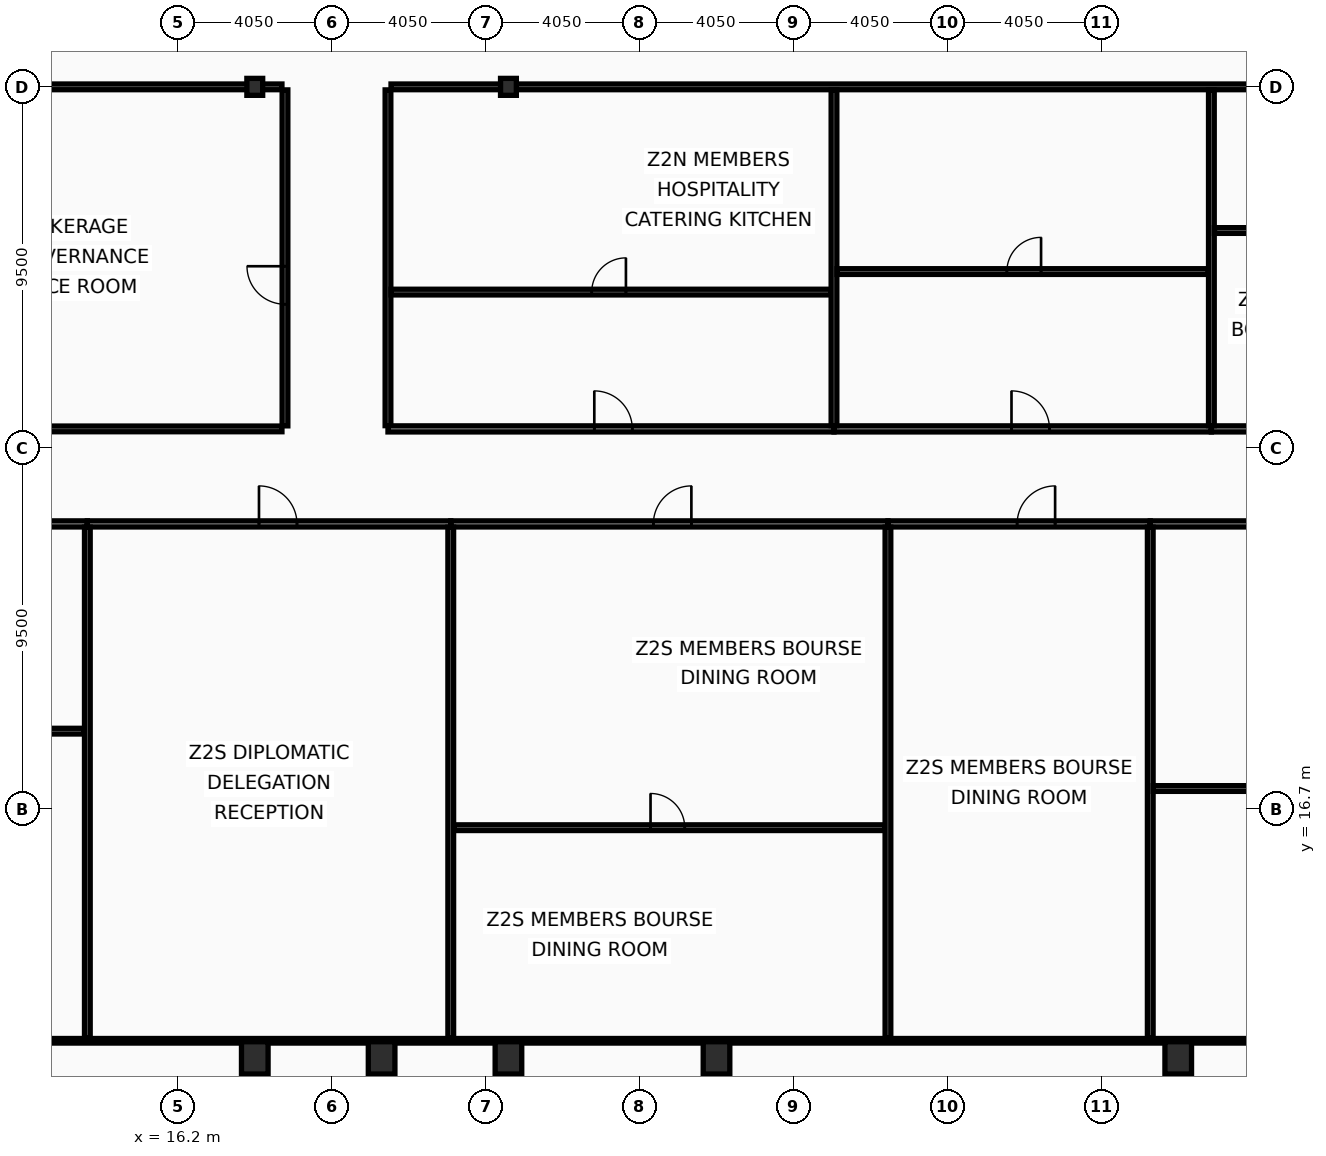
"""IFC4 building model, lengths in metres.
Left out: names, types, materials, properties, quantities, classifications, styles, units other than length and angle.
Written with IfcOpenShell. Run it as: python <this file> out.ifc"""

import sys

from ifc_helpers import new_model, si_unit, direction, frame, frame_2d, origin, origin_2d, place, context, subcontext, project, spatial, rectangle, hollow_rectangle, i_section, extrude, element, fill, save


model = new_model("IFC4")
c1 = context("Model", 3, precision=1e-05, world=origin(), true_north=direction((0.0, 1.0)))
c2 = subcontext(c1, "Body", "Model", "MODEL_VIEW")
j1 = project(units=[si_unit("LENGTHUNIT", "METRE"), si_unit("PLANEANGLEUNIT", "RADIAN")], contexts=[c1])
p1 = place(None, origin())
s1 = spatial("IfcSite", under=j1, at=p1, CompositionType="ELEMENT")
p2 = place(p1, origin())
s2 = spatial("IfcBuilding", under=s1, at=p2, CompositionType="ELEMENT")
p3 = place(p2, frame((0.0, 0.0, 139.8)))
s3 = spatial("IfcBuildingStorey", under=s2, at=p3, CompositionType="ELEMENT", Elevation=139.8)
for number, where, z_axis, x_axis in (
    (1, (18.225, 10.15, 0.0), (0.0, 0.0, 1.0), (1.0, 0.0, 0.0)),
    (2, (21.562, 10.15, 0.0), (0.0, 0.0, 1.0), (1.0, 0.0, 0.0)),
    (3, (24.9, 10.15, 0.0), (0.0, 0.0, 1.0), (1.0, 0.0, 0.0)),
    (4, (30.375, 10.15, 0.0), (0.0, 0.0, 1.0), (1.0, 0.0, 0.0)),
    (5, (42.525, 10.15, 0.0), (0.0, 0.0, 1.0), (1.0, 0.0, 0.0)),
):
    element("IfcColumn", number, at=place(p3, frame(where, z_axis=z_axis, x_axis=x_axis)), inside=s3, PredefinedType="COLUMN", context=c2, shape_type="SweptSolid", body=[
        extrude(hollow_rectangle(XDim=0.7, YDim=0.85, WallThickness=0.05, at=origin_2d()), origin(), (0.0, 0.0, 1.0), 3.6),
    ])
for number, where, z_axis, x_axis in (
    (6, (18.225, 35.7, 0.0), (0.0, 0.0, 1.0), (1.0, 0.0, 0.0)),
    (7, (24.9, 35.7, 0.0), (0.0, 0.0, 1.0), (1.0, 0.0, 0.0)),
):
    element("IfcColumn", number, at=place(p3, frame(where, z_axis=z_axis, x_axis=x_axis)), inside=s3, PredefinedType="COLUMN", context=c2, shape_type="SweptSolid", body=[
        extrude(i_section(OverallWidth=0.416, OverallDepth=0.446, WebThickness=0.039, FlangeThickness=0.063, at=origin_2d()), origin(), (0.0, 0.0, 1.0), 3.6),
    ])
p4 = place(p3, frame((6.03, 24.2, 0.0), z_axis=(0.0, 0.0, 1.0), x_axis=(1.0, 0.0, 0.0)))
e8 = element("IfcWall", 8, at=p4, inside=s3, PredefinedType="PARTITIONING", context=c2, shape_type="SweptSolid", body=[
    extrude(rectangle(XDim=7.789, YDim=0.16, at=frame_2d((3.895, 0.0))), origin(), (0.0, 0.0, 1.0), 3.44),
])
p5 = place(p4, frame((3.771, 0.0, 0.0)))
e9 = element("IfcOpeningElement", 9, at=p5, cuts=e8, PredefinedType="OPENING", context=c2, shape_type="SweptSolid", body=[
    extrude(rectangle(XDim=1.0, YDim=2.05, at=frame_2d((0.5, 1.025))), frame((0.0, 0.09, 0.0), z_axis=(0.0, -1.0, 0.0), x_axis=(1.0, 0.0, 0.0)), (0.0, 0.0, 1.0), 0.18),
])
p6 = place(p3, frame((6.095, 18.747, 0.0), z_axis=(0.0, 0.0, 1.0), x_axis=(1.0, 0.0, 0.0)))
e10 = element("IfcWall", 10, at=p6, inside=s3, PredefinedType="PARTITIONING", context=c2, shape_type="SweptSolid", body=[
    extrude(rectangle(XDim=7.644, YDim=0.15, at=frame_2d((3.822, 0.0))), origin(), (0.0, 0.0, 1.0), 2.73),
])
p7 = place(p6, frame((3.505, 0.0, 0.0)))
e11 = element("IfcOpeningElement", 11, at=p7, cuts=e10, PredefinedType="OPENING", context=c2, shape_type="SweptSolid", body=[
    extrude(rectangle(XDim=0.9, YDim=2.05, at=frame_2d((0.45, 1.025))), frame((0.0, 0.085, 0.0), z_axis=(0.0, -1.0, 0.0), x_axis=(1.0, 0.0, 0.0)), (0.0, 0.0, 1.0), 0.17),
])
p8 = place(p3, frame((13.819, 24.2, 0.0), z_axis=(0.0, 0.0, 1.0), x_axis=(1.0, 0.0, 0.0)))
e12 = element("IfcWall", 12, at=p8, inside=s3, PredefinedType="PARTITIONING", context=c2, shape_type="SweptSolid", body=[
    extrude(rectangle(XDim=9.563, YDim=0.16, at=frame_2d((4.781, 0.0))), origin(), (0.0, 0.0, 1.0), 2.73),
])
p9 = place(p8, frame((4.516, 0.0, 0.0)))
e13 = element("IfcOpeningElement", 13, at=p9, cuts=e12, PredefinedType="OPENING", context=c2, shape_type="SweptSolid", body=[
    extrude(rectangle(XDim=1.0, YDim=2.05, at=frame_2d((0.5, 1.025))), frame((0.0, 0.09, 0.0), z_axis=(0.0, -1.0, 0.0), x_axis=(1.0, 0.0, 0.0)), (0.0, 0.0, 1.0), 0.18),
])
p10 = place(p3, frame((13.819, 10.665, 0.0), z_axis=(0.0, 0.0, 1.0), x_axis=(0.0, 1.0, 0.0)))
e14 = element("IfcWall", 14, at=p10, inside=s3, PredefinedType="PARTITIONING", context=c2, shape_type="SweptSolid", body=[
    extrude(rectangle(XDim=13.45, YDim=0.15, at=frame_2d((6.725, 0.0))), origin(), (0.0, 0.0, 1.0), 2.73),
])
p11 = place(p3, frame((23.382, 24.2, 0.0), z_axis=(0.0, 0.0, 1.0), x_axis=(1.0, 0.0, 0.0)))
e15 = element("IfcWall", 15, at=p11, inside=s3, PredefinedType="PARTITIONING", context=c2, shape_type="SweptSolid", body=[
    extrude(rectangle(XDim=11.504, YDim=0.16, at=frame_2d((5.752, 0.0))), origin(), (0.0, 0.0, 1.0), 2.73),
])
p12 = place(p11, frame((5.332, 0.0, 0.0)))
e16 = element("IfcOpeningElement", 16, at=p12, cuts=e15, PredefinedType="OPENING", context=c2, shape_type="SweptSolid", body=[
    extrude(rectangle(XDim=1.0, YDim=2.05, at=frame_2d((0.5, 1.025))), frame((0.0, 0.09, 0.0), z_axis=(0.0, -1.0, 0.0), x_axis=(1.0, 0.0, 0.0)), (0.0, 0.0, 1.0), 0.18),
])
p13 = place(p3, frame((23.382, 10.665, 0.0), z_axis=(0.0, 0.0, 1.0), x_axis=(0.0, 1.0, 0.0)))
e17 = element("IfcWall", 17, at=p13, inside=s3, PredefinedType="PARTITIONING", context=c2, shape_type="SweptSolid", body=[
    extrude(rectangle(XDim=13.45, YDim=0.15, at=frame_2d((6.725, 0.0))), origin(), (0.0, 0.0, 1.0), 2.93),
])
p14 = place(p3, frame((23.462, 16.207, 0.0), z_axis=(0.0, 0.0, 1.0), x_axis=(1.0, 0.0, 0.0)))
e18 = element("IfcWall", 18, at=p14, inside=s3, PredefinedType="PARTITIONING", context=c2, shape_type="SweptSolid", body=[
    extrude(rectangle(XDim=11.344, YDim=0.15, at=frame_2d((5.672, 0.0))), origin(), (0.0, 0.0, 1.0), 2.73),
])
p15 = place(p14, frame((5.177, 0.0, 0.0)))
e19 = element("IfcOpeningElement", 19, at=p15, cuts=e18, PredefinedType="OPENING", context=c2, shape_type="SweptSolid", body=[
    extrude(rectangle(XDim=0.9, YDim=2.05, at=frame_2d((0.45, 1.025))), frame((0.0, 0.085, 0.0), z_axis=(0.0, -1.0, 0.0), x_axis=(1.0, 0.0, 0.0)), (0.0, 0.0, 1.0), 0.17),
])
p16 = place(p3, frame((34.886, 24.2, 0.0), z_axis=(0.0, 0.0, 1.0), x_axis=(1.0, 0.0, 0.0)))
e20 = element("IfcWall", 20, at=p16, inside=s3, PredefinedType="PARTITIONING", context=c2, shape_type="SweptSolid", body=[
    extrude(rectangle(XDim=6.902, YDim=0.16, at=frame_2d((3.451, 0.0))), origin(), (0.0, 0.0, 1.0), 3.44),
])
p17 = place(p16, frame((3.399, 0.0, 0.0)))
e21 = element("IfcOpeningElement", 21, at=p17, cuts=e20, PredefinedType="OPENING", context=c2, shape_type="SweptSolid", body=[
    extrude(rectangle(XDim=1.0, YDim=2.05, at=frame_2d((0.5, 1.025))), frame((0.0, 0.09, 0.0), z_axis=(0.0, -1.0, 0.0), x_axis=(1.0, 0.0, 0.0)), (0.0, 0.0, 1.0), 0.18),
])
p18 = place(p3, frame((34.886, 10.665, 0.0), z_axis=(0.0, 0.0, 1.0), x_axis=(0.0, 1.0, 0.0)))
e22 = element("IfcWall", 22, at=p18, inside=s3, PredefinedType="PARTITIONING", context=c2, shape_type="SweptSolid", body=[
    extrude(rectangle(XDim=13.45, YDim=0.15, at=frame_2d((6.725, 0.0))), origin(), (0.0, 0.0, 1.0), 2.93),
])
p19 = place(p3, frame((41.789, 24.2, 0.0), z_axis=(0.0, 0.0, 1.0), x_axis=(1.0, 0.0, 0.0)))
e23 = element("IfcWall", 23, at=p19, inside=s3, PredefinedType="PARTITIONING", context=c2, shape_type="SweptSolid", body=[
    extrude(rectangle(XDim=7.214, YDim=0.16, at=frame_2d((3.607, 0.0))), origin(), (0.0, 0.0, 1.0), 2.73),
])
p20 = place(p19, frame((3.53, 0.0, 0.0)))
e24 = element("IfcOpeningElement", 24, at=p20, cuts=e23, PredefinedType="OPENING", context=c2, shape_type="SweptSolid", body=[
    extrude(rectangle(XDim=1.0, YDim=2.05, at=frame_2d((0.5, 1.025))), frame((0.0, 0.09, 0.0), z_axis=(0.0, -1.0, 0.0), x_axis=(1.0, 0.0, 0.0)), (0.0, 0.0, 1.0), 0.18),
])
p21 = place(p3, frame((41.789, 10.665, 0.0), z_axis=(0.0, 0.0, 1.0), x_axis=(0.0, 1.0, 0.0)))
e25 = element("IfcWall", 25, at=p21, inside=s3, PredefinedType="PARTITIONING", context=c2, shape_type="SweptSolid", body=[
    extrude(rectangle(XDim=13.45, YDim=0.15, at=frame_2d((6.725, 0.0))), origin(), (0.0, 0.0, 1.0), 2.93),
])
p22 = place(p3, frame((41.869, 17.238, 0.0), z_axis=(0.0, 0.0, 1.0), x_axis=(1.0, 0.0, 0.0)))
e26 = element("IfcWall", 26, at=p22, inside=s3, PredefinedType="PARTITIONING", context=c2, shape_type="SweptSolid", body=[
    extrude(rectangle(XDim=7.054, YDim=0.15, at=frame_2d((3.527, 0.0))), origin(), (0.0, 0.0, 1.0), 2.73),
])
p23 = place(p22, frame((3.246, 0.0, 0.0)))
e27 = element("IfcOpeningElement", 27, at=p23, cuts=e26, PredefinedType="OPENING", context=c2, shape_type="SweptSolid", body=[
    extrude(rectangle(XDim=0.9, YDim=2.05, at=frame_2d((0.45, 1.025))), frame((0.0, 0.085, 0.0), z_axis=(0.0, -1.0, 0.0), x_axis=(1.0, 0.0, 0.0)), (0.0, 0.0, 1.0), 0.17),
])
p24 = place(p3, frame((19.02, 26.78, 0.0), z_axis=(0.0, 0.0, 1.0), x_axis=(0.0, 1.0, 0.0)))
e28 = element("IfcWall", 28, at=p24, inside=s3, PredefinedType="PARTITIONING", context=c2, shape_type="SweptSolid", body=[
    extrude(rectangle(XDim=8.84, YDim=0.15, at=frame_2d((4.42, 0.0))), origin(), (0.0, 0.0, 1.0), 2.93),
])
p25 = place(p24, frame((3.2, 0.0, 0.0)))
e29 = element("IfcOpeningElement", 29, at=p25, cuts=e28, PredefinedType="OPENING", context=c2, shape_type="SweptSolid", body=[
    extrude(rectangle(XDim=1.0, YDim=2.05, at=frame_2d((0.5, 1.025))), frame((0.0, 0.085, 0.0), z_axis=(0.0, -1.0, 0.0), x_axis=(1.0, 0.0, 0.0)), (0.0, 0.0, 1.0), 0.17),
])
for number, where, z_axis, x_axis in (
    (30, (6.095, 26.7, 0.0), (0.0, 0.0, 1.0), (1.0, 0.0, 0.0)),
    (31, (6.095, 35.7, 0.0), (0.0, 0.0, 1.0), (1.0, 0.0, 0.0)),
):
    element("IfcWall", number, at=place(p3, frame(where, z_axis=z_axis, x_axis=x_axis)), inside=s3, PredefinedType="PARTITIONING", context=c2, shape_type="SweptSolid", body=[
        extrude(rectangle(XDim=12.845, YDim=0.15, at=frame_2d((6.422, 0.0))), origin(), (0.0, 0.0, 1.0), 2.73),
    ])
p26 = place(p3, frame((21.73, 26.785, 0.0), z_axis=(0.0, 0.0, 1.0), x_axis=(0.0, 1.0, 0.0)))
e32 = element("IfcWall", 32, at=p26, inside=s3, PredefinedType="PARTITIONING", context=c2, shape_type="SweptSolid", body=[
    extrude(rectangle(XDim=8.835, YDim=0.15, at=frame_2d((4.417, 0.0))), origin(), (0.0, 0.0, 1.0), 2.93),
])
p27 = place(p3, frame((21.81, 35.7, 0.0), z_axis=(0.0, 0.0, 1.0), x_axis=(1.0, 0.0, 0.0)))
e33 = element("IfcWall", 33, at=p27, inside=s3, PredefinedType="PARTITIONING", context=c2, shape_type="SweptSolid", body=[
    extrude(rectangle(XDim=44.995, YDim=0.15, at=frame_2d((22.498, 0.0))), origin(), (0.0, 0.0, 1.0), 2.73),
])
p28 = place(p3, frame((21.73, 26.7, 0.0), z_axis=(0.0, 0.0, 1.0), x_axis=(1.0, 0.0, 0.0)))
e34 = element("IfcWall", 34, at=p28, inside=s3, PredefinedType="PARTITIONING", context=c2, shape_type="SweptSolid", body=[
    extrude(rectangle(XDim=11.736, YDim=0.16, at=frame_2d((5.868, 0.0))), origin(), (0.0, 0.0, 1.0), 2.73),
])
p29 = place(p28, frame((5.429, 0.0, 0.0)))
e35 = element("IfcOpeningElement", 35, at=p29, cuts=e34, PredefinedType="OPENING", context=c2, shape_type="SweptSolid", body=[
    extrude(rectangle(XDim=1.0, YDim=2.05, at=frame_2d((0.5, 1.025))), frame((0.0, 0.09, 0.0), z_axis=(0.0, -1.0, 0.0), x_axis=(1.0, 0.0, 0.0)), (0.0, 0.0, 1.0), 0.18),
])
p30 = place(p3, frame((21.81, 30.3, 0.0), z_axis=(0.0, 0.0, 1.0), x_axis=(1.0, 0.0, 0.0)))
e36 = element("IfcWall", 36, at=p30, inside=s3, PredefinedType="PARTITIONING", context=c2, shape_type="SweptSolid", body=[
    extrude(rectangle(XDim=11.576, YDim=0.15, at=frame_2d((5.788, 0.0))), origin(), (0.0, 0.0, 1.0), 2.73),
])
p31 = place(p30, frame((5.281, 0.0, 0.0)))
e37 = element("IfcOpeningElement", 37, at=p31, cuts=e36, PredefinedType="OPENING", context=c2, shape_type="SweptSolid", body=[
    extrude(rectangle(XDim=0.9, YDim=2.05, at=frame_2d((0.45, 1.025))), frame((0.0, 0.085, 0.0), z_axis=(0.0, -1.0, 0.0), x_axis=(1.0, 0.0, 0.0)), (0.0, 0.0, 1.0), 0.17),
])
p32 = place(p3, frame((33.466, 26.7, 0.0), z_axis=(0.0, 0.0, 1.0), x_axis=(1.0, 0.0, 0.0)))
e38 = element("IfcWall", 38, at=p32, inside=s3, PredefinedType="PARTITIONING", context=c2, shape_type="SweptSolid", body=[
    extrude(rectangle(XDim=9.931, YDim=0.16, at=frame_2d((4.965, 0.0))), origin(), (0.0, 0.0, 1.0), 2.73),
])
p33 = place(p32, frame((4.671, 0.0, 0.0)))
e39 = element("IfcOpeningElement", 39, at=p33, cuts=e38, PredefinedType="OPENING", context=c2, shape_type="SweptSolid", body=[
    extrude(rectangle(XDim=1.0, YDim=2.05, at=frame_2d((0.5, 1.025))), frame((0.0, 0.09, 0.0), z_axis=(0.0, -1.0, 0.0), x_axis=(1.0, 0.0, 0.0)), (0.0, 0.0, 1.0), 0.18),
])
p34 = place(p3, frame((33.466, 26.785, 0.0), z_axis=(0.0, 0.0, 1.0), x_axis=(0.0, 1.0, 0.0)))
e40 = element("IfcWall", 40, at=p34, inside=s3, PredefinedType="PARTITIONING", context=c2, shape_type="SweptSolid", body=[
    extrude(rectangle(XDim=8.835, YDim=0.15, at=frame_2d((4.417, 0.0))), origin(), (0.0, 0.0, 1.0), 2.93),
])
p35 = place(p3, frame((33.546, 30.84, 0.0), z_axis=(0.0, 0.0, 1.0), x_axis=(1.0, 0.0, 0.0)))
e41 = element("IfcWall", 41, at=p35, inside=s3, PredefinedType="PARTITIONING", context=c2, shape_type="SweptSolid", body=[
    extrude(rectangle(XDim=9.771, YDim=0.15, at=frame_2d((4.885, 0.0))), origin(), (0.0, 0.0, 1.0), 2.73),
])
p36 = place(p35, frame((4.469, 0.0, 0.0)))
e42 = element("IfcOpeningElement", 42, at=p36, cuts=e41, PredefinedType="OPENING", context=c2, shape_type="SweptSolid", body=[
    extrude(rectangle(XDim=0.9, YDim=2.05, at=frame_2d((0.45, 1.025))), frame((0.0, 0.085, 0.0), z_axis=(0.0, -1.0, 0.0), x_axis=(1.0, 0.0, 0.0)), (0.0, 0.0, 1.0), 0.17),
])
p37 = place(p3, frame((43.397, 26.7, 0.0), z_axis=(0.0, 0.0, 1.0), x_axis=(1.0, 0.0, 0.0)))
e43 = element("IfcWall", 43, at=p37, inside=s3, PredefinedType="PARTITIONING", context=c2, shape_type="SweptSolid", body=[
    extrude(rectangle(XDim=10.833, YDim=0.16, at=frame_2d((5.417, 0.0))), origin(), (0.0, 0.0, 1.0), 2.73),
])
p38 = place(p37, frame((5.05, 0.0, 0.0)))
e44 = element("IfcOpeningElement", 44, at=p38, cuts=e43, PredefinedType="OPENING", context=c2, shape_type="SweptSolid", body=[
    extrude(rectangle(XDim=1.0, YDim=2.05, at=frame_2d((0.5, 1.025))), frame((0.0, 0.09, 0.0), z_axis=(0.0, -1.0, 0.0), x_axis=(1.0, 0.0, 0.0)), (0.0, 0.0, 1.0), 0.18),
])
p39 = place(p3, frame((43.397, 26.785, 0.0), z_axis=(0.0, 0.0, 1.0), x_axis=(0.0, 1.0, 0.0)))
e45 = element("IfcWall", 45, at=p39, inside=s3, PredefinedType="PARTITIONING", context=c2, shape_type="SweptSolid", body=[
    extrude(rectangle(XDim=8.835, YDim=0.15, at=frame_2d((4.417, 0.0))), origin(), (0.0, 0.0, 1.0), 2.93),
])
p40 = place(p3, frame((43.477, 31.92, 0.0), z_axis=(0.0, 0.0, 1.0), x_axis=(1.0, 0.0, 0.0)))
e46 = element("IfcWall", 46, at=p40, inside=s3, PredefinedType="PARTITIONING", context=c2, shape_type="SweptSolid", body=[
    extrude(rectangle(XDim=10.674, YDim=0.15, at=frame_2d((5.337, 0.0))), origin(), (0.0, 0.0, 1.0), 2.73),
])
p41 = place(p40, frame((4.875, 0.0, 0.0)))
e47 = element("IfcOpeningElement", 47, at=p41, cuts=e46, PredefinedType="OPENING", context=c2, shape_type="SweptSolid", body=[
    extrude(rectangle(XDim=0.9, YDim=2.05, at=frame_2d((0.45, 1.025))), frame((0.0, 0.085, 0.0), z_axis=(0.0, -1.0, 0.0), x_axis=(1.0, 0.0, 0.0)), (0.0, 0.0, 1.0), 0.17),
])
p42 = place(p3, frame((6.095, 10.6, 0.0), z_axis=(0.0, 0.0, 1.0), x_axis=(1.0, 0.0, 0.0)))
e48 = element("IfcWall", 48, at=p42, inside=s3, PredefinedType="PARTITIONING", context=c2, shape_type="SweptSolid", body=[
    extrude(rectangle(XDim=60.71, YDim=0.12, at=frame_2d((30.355, 0.0))), origin(), (0.0, 0.0, 1.0), 2.73),
])
p43 = place(p9, origin())
e49 = element("IfcDoor", 49, at=p43, inside=s3, OperationType="SINGLE_SWING_LEFT", PredefinedType="DOOR", context=c2, shape_type="SweptSolid", body=[
    extrude(rectangle(XDim=1.0, YDim=2.05, at=frame_2d((0.5, 1.025))), frame((0.0, 0.025, 0.0), z_axis=(0.0, -1.0, 0.0), x_axis=(1.0, 0.0, 0.0)), (0.0, 0.0, 1.0), 0.05),
])
fill(e13, e49)
p44 = place(p12, origin())
e50 = element("IfcDoor", 50, at=p44, inside=s3, OperationType="SINGLE_SWING_RIGHT", PredefinedType="DOOR", context=c2, shape_type="SweptSolid", body=[
    extrude(rectangle(XDim=1.0, YDim=2.05, at=frame_2d((0.5, 1.025))), frame((0.0, 0.025, 0.0), z_axis=(0.0, -1.0, 0.0), x_axis=(1.0, 0.0, 0.0)), (0.0, 0.0, 1.0), 0.05),
])
fill(e16, e50)
p45 = place(p15, origin())
e51 = element("IfcDoor", 51, at=p45, inside=s3, OperationType="SINGLE_SWING_LEFT", PredefinedType="DOOR", context=c2, shape_type="SweptSolid", body=[
    extrude(rectangle(XDim=0.9, YDim=2.05, at=frame_2d((0.45, 1.025))), frame((0.0, 0.025, 0.0), z_axis=(0.0, -1.0, 0.0), x_axis=(1.0, 0.0, 0.0)), (0.0, 0.0, 1.0), 0.05),
])
fill(e19, e51)
p46 = place(p17, origin())
e52 = element("IfcDoor", 52, at=p46, inside=s3, OperationType="SINGLE_SWING_RIGHT", PredefinedType="DOOR", context=c2, shape_type="SweptSolid", body=[
    extrude(rectangle(XDim=1.0, YDim=2.05, at=frame_2d((0.5, 1.025))), frame((0.0, 0.025, 0.0), z_axis=(0.0, -1.0, 0.0), x_axis=(1.0, 0.0, 0.0)), (0.0, 0.0, 1.0), 0.05),
])
fill(e21, e52)
p47 = place(p25, origin())
e53 = element("IfcDoor", 53, at=p47, inside=s3, OperationType="SINGLE_SWING_RIGHT", PredefinedType="DOOR", context=c2, shape_type="SweptSolid", body=[
    extrude(rectangle(XDim=1.0, YDim=2.05, at=frame_2d((0.5, 1.025))), frame((0.0, 0.025, 0.0), z_axis=(0.0, -1.0, 0.0), x_axis=(1.0, 0.0, 0.0)), (0.0, 0.0, 1.0), 0.05),
])
fill(e29, e53)
p48 = place(p29, origin())
e54 = element("IfcDoor", 54, at=p48, inside=s3, OperationType="SINGLE_SWING_LEFT", PredefinedType="DOOR", context=c2, shape_type="SweptSolid", body=[
    extrude(rectangle(XDim=1.0, YDim=2.05, at=frame_2d((0.5, 1.025))), frame((0.0, 0.025, 0.0), z_axis=(0.0, -1.0, 0.0), x_axis=(1.0, 0.0, 0.0)), (0.0, 0.0, 1.0), 0.05),
])
fill(e35, e54)
p49 = place(p31, origin())
e55 = element("IfcDoor", 55, at=p49, inside=s3, OperationType="SINGLE_SWING_RIGHT", PredefinedType="DOOR", context=c2, shape_type="SweptSolid", body=[
    extrude(rectangle(XDim=0.9, YDim=2.05, at=frame_2d((0.45, 1.025))), frame((0.0, 0.025, 0.0), z_axis=(0.0, -1.0, 0.0), x_axis=(1.0, 0.0, 0.0)), (0.0, 0.0, 1.0), 0.05),
])
fill(e37, e55)
p50 = place(p33, origin())
e56 = element("IfcDoor", 56, at=p50, inside=s3, OperationType="SINGLE_SWING_LEFT", PredefinedType="DOOR", context=c2, shape_type="SweptSolid", body=[
    extrude(rectangle(XDim=1.0, YDim=2.05, at=frame_2d((0.5, 1.025))), frame((0.0, 0.025, 0.0), z_axis=(0.0, -1.0, 0.0), x_axis=(1.0, 0.0, 0.0)), (0.0, 0.0, 1.0), 0.05),
])
fill(e39, e56)
p51 = place(p36, origin())
e57 = element("IfcDoor", 57, at=p51, inside=s3, OperationType="SINGLE_SWING_RIGHT", PredefinedType="DOOR", context=c2, shape_type="SweptSolid", body=[
    extrude(rectangle(XDim=0.9, YDim=2.05, at=frame_2d((0.45, 1.025))), frame((0.0, 0.025, 0.0), z_axis=(0.0, -1.0, 0.0), x_axis=(1.0, 0.0, 0.0)), (0.0, 0.0, 1.0), 0.05),
])
fill(e42, e57)
save(model, sys.argv[1])
